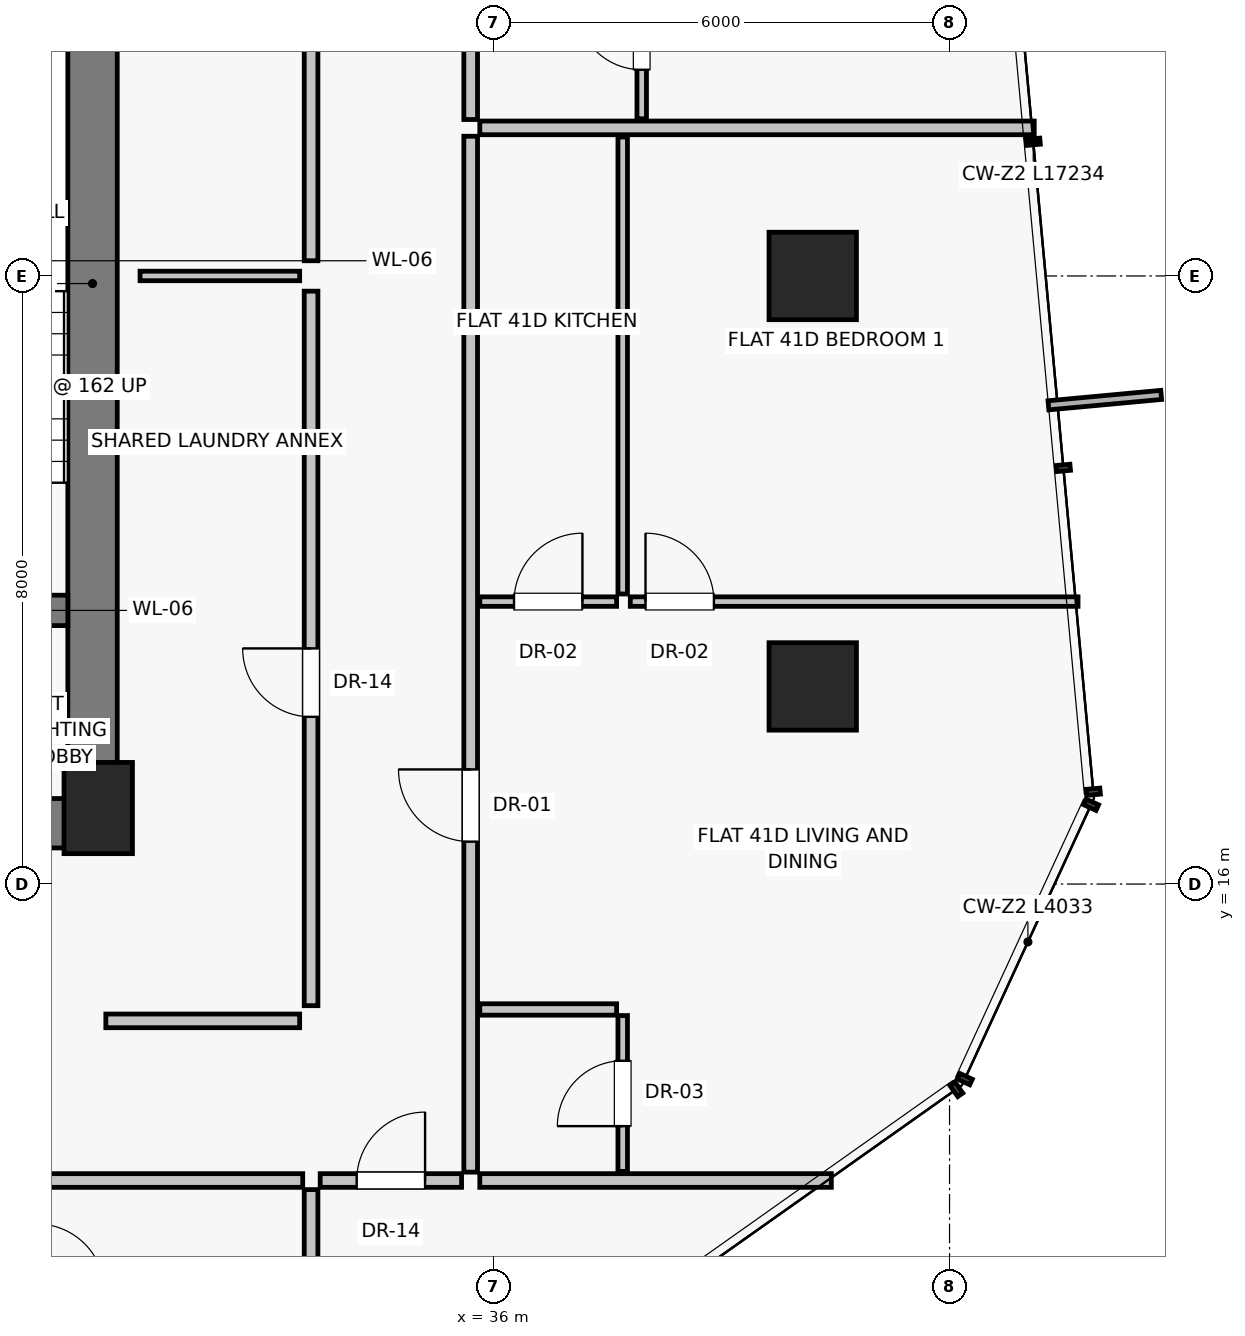
"""IFC4 building model, lengths in metres.
Left out: names, types, materials, properties, quantities, classifications, styles, units other than length and angle.
Written with IfcOpenShell. Run it as: python <this file> out.ifc"""

import sys

from ifc_helpers import new_model, si_unit, direction, frame, frame_2d, origin, origin_2d, place, context, subcontext, project, spatial, rectangle, extrude, source, transform, mapped, element, fill, save


model = new_model("IFC4")
c1 = context("Model", 3, precision=1e-05, world=origin(), true_north=direction((0.0, 1.0)))
c2 = subcontext(c1, "Body", "Model", "MODEL_VIEW")
j1 = project(units=[si_unit("LENGTHUNIT", "METRE"), si_unit("PLANEANGLEUNIT", "RADIAN")], contexts=[c1])
p1 = place(None, origin())
s1 = spatial("IfcSite", under=j1, at=p1, CompositionType="ELEMENT")
p2 = place(p1, origin())
s2 = spatial("IfcBuilding", under=s1, at=p2, CompositionType="ELEMENT")
p3 = place(p2, frame((0.0, 0.0, 145.75)))
s3 = spatial("IfcBuildingStorey", under=s2, at=p3, CompositionType="ELEMENT", Elevation=145.75)
p4 = place(p3, frame((30.8, 17.0, 0.0), z_axis=(0.0, 0.0, 1.0), x_axis=(1.0, 0.0, 0.0)))
e1 = element("IfcColumn", 1, at=p4, inside=s3, PredefinedType="PILASTER", context=c2, shape_type="SweptSolid", body=[
    extrude(rectangle(XDim=0.9, YDim=1.2, at=origin_2d()), origin(), (0.0, 0.0, 1.0), 3.25),
])
for number, where, z_axis, x_axis in (
    (2, (40.2, 18.6, 0.0), (0.0, 0.0, 1.0), (1.0, 0.0, 0.0)),
    (3, (40.2, 24.0, 0.0), (0.0, 0.0, 1.0), (1.0, 0.0, 0.0)),
):
    element("IfcColumn", number, at=place(p3, frame(where, z_axis=z_axis, x_axis=x_axis)), inside=s3, PredefinedType="COLUMN", context=c2, shape_type="SweptSolid", body=[
        extrude(rectangle(XDim=1.15, YDim=1.15, at=origin_2d()), origin(), (0.0, 0.0, 1.0), 3.25),
    ])
p5 = place(p3, frame((30.725, 16.8, 0.0), z_axis=(0.0, 0.0, 1.0), x_axis=(0.0, 1.0, 0.0)))
e4 = element("IfcWall", 4, at=p5, inside=s3, PredefinedType="SHEAR", context=c2, shape_type="SweptSolid", body=[
    extrude(rectangle(XDim=14.2, YDim=0.65, at=frame_2d((7.1, 0.0))), origin(), (0.0, 0.0, 1.0), 3.0),
])
p6 = place(p3, frame((24.95, 16.8, 0.0), z_axis=(0.0, 0.0, 1.0), x_axis=(1.0, 0.0, 0.0)))
e5 = element("IfcWall", 5, at=p6, inside=s3, PredefinedType="SHEAR", context=c2, shape_type="SweptSolid", body=[
    extrude(rectangle(XDim=5.85, YDim=0.65, at=frame_2d((2.925, 0.0))), origin(), (0.0, 0.0, 1.0), 3.0),
])
p7 = place(p6, frame((2.15, 0.0, 0.0)))
e6 = element("IfcOpeningElement", 6, at=p7, cuts=e5, PredefinedType="OPENING", context=c2, shape_type="SweptSolid", body=[
    extrude(rectangle(XDim=1.2, YDim=2.03, at=frame_2d((0.6, 1.015))), frame((0.0, 0.335, 0.0), z_axis=(0.0, -1.0, 0.0), x_axis=(1.0, 0.0, 0.0)), (0.0, 0.0, 1.0), 0.67),
])
p8 = place(p3, frame((27.0, 19.6, 0.0), z_axis=(0.0, 0.0, 1.0), x_axis=(1.0, 0.0, 0.0)))
e7 = element("IfcWall", 7, at=p8, inside=s3, PredefinedType="SHEAR", context=c2, shape_type="SweptSolid", body=[
    extrude(rectangle(XDim=3.4, YDim=0.4, at=frame_2d((1.7, 0.0))), origin(), (0.0, 0.0, 1.0), 3.0),
])
p9 = place(p8, frame((1.05, 0.0, 0.0)))
e8 = element("IfcOpeningElement", 8, at=p9, cuts=e7, PredefinedType="OPENING", context=c2, shape_type="SweptSolid", body=[
    extrude(rectangle(XDim=1.1, YDim=2.03, at=frame_2d((0.55, 1.015))), frame((0.0, 0.21, 0.0), z_axis=(0.0, -1.0, 0.0), x_axis=(1.0, 0.0, 0.0)), (0.0, 0.0, 1.0), 0.42),
])
p10 = place(p3, frame((33.6, 14.4, 0.0), z_axis=(0.0, 0.0, 1.0), x_axis=(0.0, 1.0, 0.0)))
e9 = element("IfcWall", 9, at=p10, inside=s3, PredefinedType="PARTITIONING", context=c2, shape_type="SweptSolid", body=[
    extrude(rectangle(XDim=9.4, YDim=0.18, at=frame_2d((4.7, 0.0))), origin(), (0.0, 0.0, 1.0), 3.0),
])
p11 = place(p10, frame((3.8, 0.0, 0.0)))
e10 = element("IfcOpeningElement", 10, at=p11, cuts=e9, PredefinedType="OPENING", context=c2, shape_type="SweptSolid", body=[
    extrude(rectangle(XDim=0.9, YDim=2.01, at=frame_2d((0.45, 1.005))), frame((0.0, 0.1, 0.0), z_axis=(0.0, -1.0, 0.0), x_axis=(1.0, 0.0, 0.0)), (0.0, 0.0, 1.0), 0.2),
])
p12 = place(p3, frame((33.6, 24.2, 0.0), z_axis=(0.0, 0.0, 1.0), x_axis=(0.0, 1.0, 0.0)))
e11 = element("IfcWall", 11, at=p12, inside=s3, PredefinedType="PARTITIONING", context=c2, shape_type="SweptSolid", body=[
    extrude(rectangle(XDim=9.2, YDim=0.18, at=frame_2d((4.6, 0.0))), origin(), (0.0, 0.0, 1.0), 3.0),
])
p13 = place(p12, frame((3.8, 0.0, 0.0)))
e12 = element("IfcOpeningElement", 12, at=p13, cuts=e11, PredefinedType="OPENING", context=c2, shape_type="SweptSolid", body=[
    extrude(rectangle(XDim=0.9, YDim=2.01, at=frame_2d((0.45, 1.005))), frame((0.0, 0.1, 0.0), z_axis=(0.0, -1.0, 0.0), x_axis=(1.0, 0.0, 0.0)), (0.0, 0.0, 1.0), 0.2),
])
p14 = place(p3, frame((31.35, 24.0, 0.0), z_axis=(0.0, 0.0, 1.0), x_axis=(1.0, 0.0, 0.0)))
e13 = element("IfcWall", 13, at=p14, inside=s3, PredefinedType="PARTITIONING", context=c2, shape_type="SweptSolid", body=[
    extrude(rectangle(XDim=2.1, YDim=0.125, at=frame_2d((1.05, 0.0))), origin(), (0.0, 0.0, 1.0), 3.0),
])
p15 = place(p3, frame((30.9, 14.2, 0.0), z_axis=(0.0, 0.0, 1.0), x_axis=(1.0, 0.0, 0.0)))
e14 = element("IfcWall", 14, at=p15, inside=s3, PredefinedType="PARTITIONING", context=c2, shape_type="SweptSolid", body=[
    extrude(rectangle(XDim=2.55, YDim=0.18, at=frame_2d((1.275, 0.0))), origin(), (0.0, 0.0, 1.0), 3.0),
])
p16 = place(p3, frame((33.6, 11.98, 0.0), z_axis=(0.0, 0.0, 1.0), x_axis=(0.0, -1.0, 0.0)))
e15 = element("IfcWall", 15, at=p16, inside=s3, PredefinedType="PARTITIONING", context=c2, shape_type="SweptSolid", body=[
    extrude(rectangle(XDim=4.723, YDim=0.18, at=frame_2d((2.361, 0.0))), origin(), (0.0, 0.0, 1.0), 3.0),
])
p17 = place(p3, frame((25.854, 12.1, 0.0), z_axis=(0.0, 0.0, 1.0), x_axis=(1.0, 0.0, 0.0)))
e16 = element("IfcWall", 16, at=p17, inside=s3, PredefinedType="PARTITIONING", context=c2, shape_type="SweptSolid", body=[
    extrude(rectangle(XDim=7.636, YDim=0.18, at=frame_2d((3.818, 0.0))), origin(), (0.0, 0.0, 1.0), 2.58),
])
p18 = place(p17, frame((2.661, 0.0, 0.0)))
e17 = element("IfcOpeningElement", 17, at=p18, cuts=e16, PredefinedType="OPENING", context=c2, shape_type="SweptSolid", body=[
    extrude(rectangle(XDim=0.95, YDim=2.02, at=frame_2d((0.475, 1.01))), frame((0.0, 0.1, 0.0), z_axis=(0.0, -1.0, 0.0), x_axis=(1.0, 0.0, 0.0)), (0.0, 0.0, 1.0), 0.2),
])
p19 = place(p3, frame((35.82, 12.1, 0.0), z_axis=(0.0, 0.0, 1.0), x_axis=(1.0, 0.0, 0.0)))
e18 = element("IfcWall", 18, at=p19, inside=s3, PredefinedType="PARTITIONING", context=c2, shape_type="SweptSolid", body=[
    extrude(rectangle(XDim=4.625, YDim=0.18, at=frame_2d((2.312, 0.0))), origin(), (0.0, 0.0, 1.0), 3.0),
])
p20 = place(p3, frame((35.7, 12.21, 0.0), z_axis=(0.0, 0.0, 1.0), x_axis=(0.0, 1.0, 0.0)))
e19 = element("IfcWall", 19, at=p20, inside=s3, PredefinedType="PARTITIONING", context=c2, shape_type="SweptSolid", body=[
    extrude(rectangle(XDim=13.628, YDim=0.18, at=frame_2d((6.814, 0.0))), origin(), (0.0, 0.0, 1.0), 2.58),
])
p21 = place(p20, frame((4.348, 0.0, 0.0)))
e20 = element("IfcOpeningElement", 20, at=p21, cuts=e19, PredefinedType="OPENING", context=c2, shape_type="SweptSolid", body=[
    extrude(rectangle(XDim=0.95, YDim=2.02, at=frame_2d((0.475, 1.01))), frame((0.0, 0.1, 0.0), z_axis=(0.0, -1.0, 0.0), x_axis=(1.0, 0.0, 0.0)), (0.0, 0.0, 1.0), 0.2),
])
p22 = place(p3, frame((35.82, 14.35, 0.0), z_axis=(0.0, 0.0, 1.0), x_axis=(1.0, 0.0, 0.0)))
e21 = element("IfcWall", 21, at=p22, inside=s3, PredefinedType="PARTITIONING", context=c2, shape_type="SweptSolid", body=[
    extrude(rectangle(XDim=1.8, YDim=0.15, at=frame_2d((0.9, 0.0))), origin(), (0.0, 0.0, 1.0), 3.0),
])
p23 = place(p3, frame((37.7, 12.22, 0.0), z_axis=(0.0, 0.0, 1.0), x_axis=(0.0, 1.0, 0.0)))
e22 = element("IfcWall", 22, at=p23, inside=s3, PredefinedType="PARTITIONING", context=c2, shape_type="SweptSolid", body=[
    extrude(rectangle(XDim=2.05, YDim=0.125, at=frame_2d((1.025, 0.0))), origin(), (0.0, 0.0, 1.0), 3.0),
])
p24 = place(p23, frame((0.595, 0.0, 0.0)))
e23 = element("IfcOpeningElement", 23, at=p24, cuts=e22, PredefinedType="OPENING", context=c2, shape_type="SweptSolid", body=[
    extrude(rectangle(XDim=0.86, YDim=2.01, at=frame_2d((0.43, 1.005))), frame((0.0, 0.073, 0.0), z_axis=(0.0, -1.0, 0.0), x_axis=(1.0, 0.0, 0.0)), (0.0, 0.0, 1.0), 0.145),
])
p25 = place(p3, frame((35.82, 19.716, 0.0), z_axis=(0.0, 0.0, 1.0), x_axis=(1.0, 0.0, 0.0)))
e24 = element("IfcWall", 24, at=p25, inside=s3, PredefinedType="PARTITIONING", context=c2, shape_type="SweptSolid", body=[
    extrude(rectangle(XDim=1.8, YDim=0.125, at=frame_2d((0.9, 0.0))), origin(), (0.0, 0.0, 1.0), 3.0),
])
p26 = place(p25, frame((0.45, 0.0, 0.0)))
e25 = element("IfcOpeningElement", 25, at=p26, cuts=e24, PredefinedType="OPENING", context=c2, shape_type="SweptSolid", body=[
    extrude(rectangle(XDim=0.9, YDim=2.01, at=frame_2d((0.45, 1.005))), frame((0.0, 0.073, 0.0), z_axis=(0.0, -1.0, 0.0), x_axis=(1.0, 0.0, 0.0)), (0.0, 0.0, 1.0), 0.145),
])
p27 = place(p3, frame((37.7, 19.816, 0.0), z_axis=(0.0, 0.0, 1.0), x_axis=(0.0, 1.0, 0.0)))
e26 = element("IfcWall", 26, at=p27, inside=s3, PredefinedType="PARTITIONING", context=c2, shape_type="SweptSolid", body=[
    extrude(rectangle(XDim=6.012, YDim=0.125, at=frame_2d((3.006, 0.0))), origin(), (0.0, 0.0, 1.0), 3.0),
])
p28 = place(p3, frame((37.8, 19.716, 0.0), z_axis=(0.0, 0.0, 1.0), x_axis=(1.0, 0.0, 0.0)))
e27 = element("IfcWall", 27, at=p28, inside=s3, PredefinedType="PARTITIONING", context=c2, shape_type="SweptSolid", body=[
    extrude(rectangle(XDim=5.89, YDim=0.125, at=frame_2d((2.945, 0.0))), origin(), (0.0, 0.0, 1.0), 3.0),
])
p29 = place(p28, frame((0.2, 0.0, 0.0)))
e28 = element("IfcOpeningElement", 28, at=p29, cuts=e27, PredefinedType="OPENING", context=c2, shape_type="SweptSolid", body=[
    extrude(rectangle(XDim=0.9, YDim=2.01, at=frame_2d((0.45, 1.005))), frame((0.0, 0.073, 0.0), z_axis=(0.0, -1.0, 0.0), x_axis=(1.0, 0.0, 0.0)), (0.0, 0.0, 1.0), 0.145),
])
p30 = place(p3, frame((35.82, 25.948, 0.0), z_axis=(0.0, 0.0, 1.0), x_axis=(1.0, 0.0, 0.0)))
e29 = element("IfcWall", 29, at=p30, inside=s3, PredefinedType="PARTITIONING", context=c2, shape_type="SweptSolid", body=[
    extrude(rectangle(XDim=7.294, YDim=0.18, at=frame_2d((3.647, 0.0))), origin(), (0.0, 0.0, 1.0), 3.0),
])
p31 = place(p3, frame((35.7, 26.058, 0.0), z_axis=(0.0, 0.0, 1.0), x_axis=(0.0, 1.0, 0.0)))
e30 = element("IfcWall", 30, at=p31, inside=s3, PredefinedType="PARTITIONING", context=c2, shape_type="SweptSolid", body=[
    extrude(rectangle(XDim=6.582, YDim=0.18, at=frame_2d((3.291, 0.0))), origin(), (0.0, 0.0, 1.0), 2.58),
])
p32 = place(p31, frame((4.072, 0.0, 0.0)))
e31 = element("IfcOpeningElement", 31, at=p32, cuts=e30, PredefinedType="OPENING", context=c2, shape_type="SweptSolid", body=[
    extrude(rectangle(XDim=0.95, YDim=2.02, at=frame_2d((0.475, 1.01))), frame((0.0, 0.1, 0.0), z_axis=(0.0, -1.0, 0.0), x_axis=(1.0, 0.0, 0.0)), (0.0, 0.0, 1.0), 0.2),
])
p33 = place(p3, frame((37.95, 26.068, 0.0), z_axis=(0.0, 0.0, 1.0), x_axis=(0.0, 1.0, 0.0)))
e32 = element("IfcWall", 32, at=p33, inside=s3, PredefinedType="PARTITIONING", context=c2, shape_type="SweptSolid", body=[
    extrude(rectangle(XDim=2.15, YDim=0.125, at=frame_2d((1.075, 0.0))), origin(), (0.0, 0.0, 1.0), 3.0),
])
p34 = place(p33, frame((0.645, 0.0, 0.0)))
e33 = element("IfcOpeningElement", 33, at=p34, cuts=e32, PredefinedType="OPENING", context=c2, shape_type="SweptSolid", body=[
    extrude(rectangle(XDim=0.86, YDim=2.01, at=frame_2d((0.43, 1.005))), frame((0.0, 0.073, 0.0), z_axis=(0.0, -1.0, 0.0), x_axis=(1.0, 0.0, 0.0)), (0.0, 0.0, 1.0), 0.145),
])
p35 = place(p3, frame((33.72, 12.1, 0.0), z_axis=(0.0, 0.0, 1.0), x_axis=(1.0, 0.0, 0.0)))
e34 = element("IfcWall", 34, at=p35, inside=s3, PredefinedType="PARTITIONING", context=c2, shape_type="SweptSolid", body=[
    extrude(rectangle(XDim=1.86, YDim=0.18, at=frame_2d((0.93, 0.0))), origin(), (0.0, 0.0, 1.0), 3.0),
])
p36 = place(p35, frame((0.48, 0.0, 0.0)))
e35 = element("IfcOpeningElement", 35, at=p36, cuts=e34, PredefinedType="OPENING", context=c2, shape_type="SweptSolid", body=[
    extrude(rectangle(XDim=0.9, YDim=2.01, at=frame_2d((0.45, 1.005))), frame((0.0, 0.1, 0.0), z_axis=(0.0, -1.0, 0.0), x_axis=(1.0, 0.0, 0.0)), (0.0, 0.0, 1.0), 0.2),
])
m1 = source(origin(), c2, "Body", "SweptSolid", [
    extrude(rectangle(XDim=0.9, YDim=2.01, at=frame_2d((0.45, 1.005))), frame((0.0, 0.025, 0.0), z_axis=(0.0, -1.0, 0.0), x_axis=(1.0, 0.0, 0.0)), (0.0, 0.0, 1.0), 0.05),
])
p37 = place(p11, origin())
e36 = element("IfcDoor", 36, at=p37, inside=s3, OperationType="SINGLE_SWING_RIGHT", PredefinedType="DOOR", context=c2, shape_type="MappedRepresentation", body=[
    mapped(m1, transform((0.0, 0.0, 0.0), scale=1.0)),
])
fill(e10, e36)
m2 = source(origin(), c2, "Body", "SweptSolid", [
    extrude(rectangle(XDim=0.95, YDim=2.02, at=frame_2d((0.475, 1.01))), frame((0.0, 0.025, 0.0), z_axis=(0.0, -1.0, 0.0), x_axis=(1.0, 0.0, 0.0)), (0.0, 0.0, 1.0), 0.05),
])
p38 = place(p21, origin())
e37 = element("IfcDoor", 37, at=p38, inside=s3, OperationType="SINGLE_SWING_RIGHT", PredefinedType="DOOR", context=c2, shape_type="MappedRepresentation", body=[
    mapped(m2, transform((0.0, 0.0, 0.0), scale=1.0)),
])
fill(e20, e37)
m3 = source(origin(), c2, "Body", "SweptSolid", [
    extrude(rectangle(XDim=0.86, YDim=2.01, at=frame_2d((0.43, 1.005))), frame((0.0, 0.025, 0.0), z_axis=(0.0, -1.0, 0.0), x_axis=(1.0, 0.0, 0.0)), (0.0, 0.0, 1.0), 0.05),
])
p39 = place(p24, origin())
e38 = element("IfcDoor", 38, at=p39, inside=s3, OperationType="SINGLE_SWING_LEFT", PredefinedType="DOOR", context=c2, shape_type="MappedRepresentation", body=[
    mapped(m3, transform((0.0, 0.0, 0.0), scale=1.0)),
])
fill(e23, e38)
p40 = place(p26, origin())
e39 = element("IfcDoor", 39, at=p40, inside=s3, OperationType="SINGLE_SWING_RIGHT", PredefinedType="DOOR", context=c2, shape_type="MappedRepresentation", body=[
    mapped(m1, transform((0.0, 0.0, 0.0), scale=1.0)),
])
fill(e25, e39)
p41 = place(p29, origin())
e40 = element("IfcDoor", 40, at=p41, inside=s3, OperationType="SINGLE_SWING_LEFT", PredefinedType="DOOR", context=c2, shape_type="MappedRepresentation", body=[
    mapped(m1, transform((0.0, 0.0, 0.0), scale=1.0)),
])
fill(e28, e40)
p42 = place(p34, origin())
e41 = element("IfcDoor", 41, at=p42, inside=s3, OperationType="SINGLE_SWING_RIGHT", PredefinedType="DOOR", context=c2, shape_type="MappedRepresentation", body=[
    mapped(m3, transform((0.0, 0.0, 0.0), scale=1.0)),
])
fill(e33, e41)
p43 = place(p36, origin())
e42 = element("IfcDoor", 42, at=p43, inside=s3, OperationType="SINGLE_SWING_RIGHT", PredefinedType="DOOR", context=c2, shape_type="MappedRepresentation", body=[
    mapped(m1, transform((0.0, 0.0, 0.0), scale=1.0)),
])
fill(e35, e42)
save(model, sys.argv[1])
